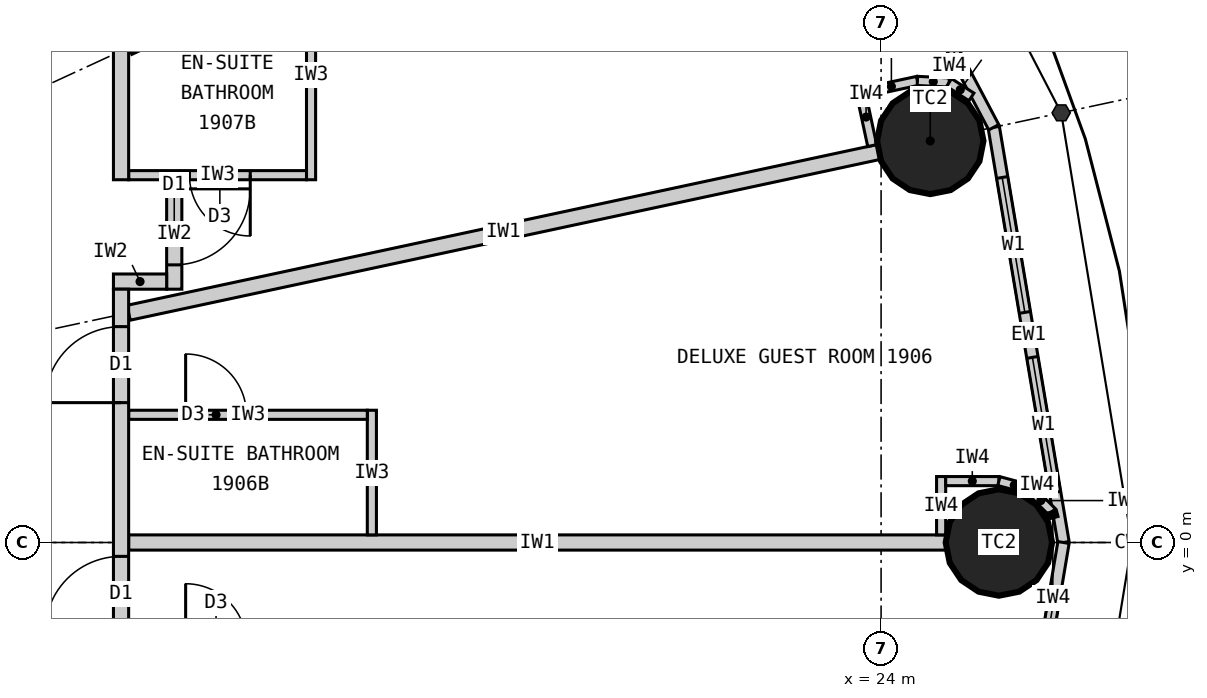
"""IFC4 building model, lengths in metres.
Left out: names, types, materials, properties, quantities, classifications, styles, units other than length and angle.
Written with IfcOpenShell. Run it as: python <this file> out.ifc"""

import sys

from ifc_helpers import new_model, si_unit, direction, frame, frame_2d, origin, origin_2d, place, context, subcontext, project, spatial, rectangle, circle, extrude, element, fill, save


model = new_model("IFC4")
c1 = context("Model", 3, precision=1e-05, world=origin(), true_north=direction((0.0, 1.0)))
c2 = subcontext(c1, "Body", "Model", "MODEL_VIEW")
j1 = project(units=[si_unit("LENGTHUNIT", "METRE"), si_unit("PLANEANGLEUNIT", "RADIAN")], contexts=[c1])
p1 = place(None, origin())
s1 = spatial("IfcSite", under=j1, at=p1, CompositionType="ELEMENT")
p2 = place(p1, origin())
s2 = spatial("IfcBuilding", under=s1, at=p2, CompositionType="ELEMENT")
p3 = place(p2, frame((0.0, 0.0, 77.1)))
s3 = spatial("IfcBuildingStorey", under=s2, at=p3, CompositionType="ELEMENT", Elevation=77.1)
for number, where, z_axis, x_axis in (
    (1, (25.55, 0.0, 0.0), (0.0, 0.0, 1.0), (1.0, 0.0, 0.0)),
    (2, (24.647, 5.283, 0.0), (0.0, 0.0, 1.0), (1.0, 0.0, 0.0)),
):
    element("IfcColumn", number, at=place(p3, frame(where, z_axis=z_axis, x_axis=x_axis)), inside=s3, PredefinedType="COLUMN", context=c2, shape_type="SweptSolid", body=[
        extrude(circle(Radius=0.7, at=origin_2d()), origin(), (0.0, 0.0, 1.0), 3.3),
    ])
p4 = place(p3, frame((26.4, 0.0, 0.0), z_axis=(0.0, 0.0, 1.0), x_axis=(-0.165642551694, 0.986185857264, 0.0)))
e3 = element("IfcWall", 3, at=p4, inside=s3, PredefinedType="ELEMENTEDWALL", context=c2, shape_type="SweptSolid", body=[
    extrude(rectangle(XDim=5.539, YDim=0.15, at=frame_2d((2.77, 0.0))), origin(), (0.0, 0.0, 1.0), 3.12),
])
p5 = place(p4, frame((0.669, 0.0, 0.9)))
e4 = element("IfcOpeningElement", 4, at=p5, cuts=e3, PredefinedType="OPENING", context=c2, shape_type="SweptSolid", body=[
    extrude(rectangle(XDim=1.8, YDim=1.9, at=frame_2d((0.9, 0.95))), frame((0.0, 0.085, 0.0), z_axis=(0.0, -1.0, 0.0), x_axis=(1.0, 0.0, 0.0)), (0.0, 0.0, 1.0), 0.17),
])
p6 = place(p4, frame((3.07, 0.0, 0.9)))
e5 = element("IfcOpeningElement", 5, at=p6, cuts=e3, PredefinedType="OPENING", context=c2, shape_type="SweptSolid", body=[
    extrude(rectangle(XDim=1.8, YDim=1.9, at=frame_2d((0.9, 0.95))), frame((0.0, 0.085, 0.0), z_axis=(0.0, -1.0, 0.0), x_axis=(1.0, 0.0, 0.0)), (0.0, 0.0, 1.0), 0.17),
])
p7 = place(p3, frame((25.482, 5.462, 0.0), z_axis=(0.0, 0.0, 1.0), x_axis=(-0.467296867008, 0.884100468321, 0.0)))
e6 = element("IfcWall", 6, at=p7, inside=s3, PredefinedType="ELEMENTEDWALL", context=c2, shape_type="SweptSolid", body=[
    extrude(rectangle(XDim=5.734, YDim=0.15, at=frame_2d((2.867, 0.0))), origin(), (0.0, 0.0, 1.0), 3.12),
])
p8 = place(p7, frame((0.767, 0.0, 0.9)))
e7 = element("IfcOpeningElement", 7, at=p8, cuts=e6, PredefinedType="OPENING", context=c2, shape_type="SweptSolid", body=[
    extrude(rectangle(XDim=1.8, YDim=1.9, at=frame_2d((0.9, 0.95))), frame((0.0, 0.085, 0.0), z_axis=(0.0, -1.0, 0.0), x_axis=(1.0, 0.0, 0.0)), (0.0, 0.0, 1.0), 0.17),
])
p9 = place(p7, frame((3.167, 0.0, 0.9)))
e8 = element("IfcOpeningElement", 8, at=p9, cuts=e6, PredefinedType="OPENING", context=c2, shape_type="SweptSolid", body=[
    extrude(rectangle(XDim=1.8, YDim=1.9, at=frame_2d((0.9, 0.95))), frame((0.0, 0.085, 0.0), z_axis=(0.0, -1.0, 0.0), x_axis=(1.0, 0.0, 0.0)), (0.0, 0.0, 1.0), 0.17),
])
p10 = place(p3, frame((25.482, -5.462, 0.0), z_axis=(0.0, 0.0, 1.0), x_axis=(0.165642551694, 0.986185857264, 0.0)))
e9 = element("IfcWall", 9, at=p10, inside=s3, PredefinedType="ELEMENTEDWALL", context=c2, shape_type="SweptSolid", body=[
    extrude(rectangle(XDim=5.539, YDim=0.15, at=frame_2d((2.77, 0.0))), origin(), (0.0, 0.0, 1.0), 3.12),
])
p11 = place(p10, frame((0.669, 0.0, 0.9)))
e10 = element("IfcOpeningElement", 10, at=p11, cuts=e9, PredefinedType="OPENING", context=c2, shape_type="SweptSolid", body=[
    extrude(rectangle(XDim=1.8, YDim=1.9, at=frame_2d((0.9, 0.95))), frame((0.0, 0.085, 0.0), z_axis=(0.0, -1.0, 0.0), x_axis=(1.0, 0.0, 0.0)), (0.0, 0.0, 1.0), 0.17),
])
p12 = place(p10, frame((3.07, 0.0, 0.9)))
e11 = element("IfcOpeningElement", 11, at=p12, cuts=e9, PredefinedType="OPENING", context=c2, shape_type="SweptSolid", body=[
    extrude(rectangle(XDim=1.8, YDim=1.9, at=frame_2d((0.9, 0.95))), frame((0.0, 0.085, 0.0), z_axis=(0.0, -1.0, 0.0), x_axis=(1.0, 0.0, 0.0)), (0.0, 0.0, 1.0), 0.17),
])
p13 = place(p3, frame((14.1, 0.0, 0.0), z_axis=(0.0, 0.0, 1.0), x_axis=(1.0, 0.0, 0.0)))
e12 = element("IfcWall", 12, at=p13, inside=s3, PredefinedType="PARTITIONING", context=c2, shape_type="SweptSolid", body=[
    extrude(rectangle(XDim=10.75, YDim=0.2, at=frame_2d((5.375, 0.0))), origin(), (0.0, 0.0, 1.0), 2.27),
])
p14 = place(p3, frame((14.1, 3.022, 0.0), z_axis=(0.0, 0.0, 1.0), x_axis=(0.977790014929, 0.209586943072, 0.0)))
e13 = element("IfcWall", 13, at=p14, inside=s3, PredefinedType="PARTITIONING", context=c2, shape_type="SweptSolid", body=[
    extrude(rectangle(XDim=10.087, YDim=0.2, at=frame_2d((5.043, 0.0))), origin(), (0.0, 0.0, 1.0), 2.32),
])
p15 = place(p3, frame((14.1, 6.512, 0.0), z_axis=(0.0, 0.0, 1.0), x_axis=(0.907832871056, 0.419332181247, 0.0)))
e14 = element("IfcWall", 14, at=p15, inside=s3, PredefinedType="PARTITIONING", context=c2, shape_type="SweptSolid", body=[
    extrude(rectangle(XDim=8.023, YDim=0.2, at=frame_2d((4.011, 0.0))), origin(), (0.0, 0.0, 1.0), 2.32),
])
p16 = place(p3, frame((17.3, 0.1, 0.0), z_axis=(0.0, 0.0, 1.0), x_axis=(0.0, 1.0, 0.0)))
e15 = element("IfcWall", 15, at=p16, inside=s3, PredefinedType="PARTITIONING", context=c2, shape_type="SweptSolid", body=[
    extrude(rectangle(XDim=1.64, YDim=0.12, at=frame_2d((0.82, 0.0))), origin(), (0.0, 0.0, 1.0), 3.12),
])
p17 = place(p3, frame((14.1, 1.68, 0.0), z_axis=(0.0, 0.0, 1.0), x_axis=(1.0, 0.0, 0.0)))
e16 = element("IfcWall", 16, at=p17, inside=s3, PredefinedType="PARTITIONING", context=c2, shape_type="SweptSolid", body=[
    extrude(rectangle(XDim=3.14, YDim=0.12, at=frame_2d((1.57, 0.0))), origin(), (0.0, 0.0, 1.0), 3.12),
])
p18 = place(p17, frame((0.75, 0.0, 0.0)))
e17 = element("IfcOpeningElement", 17, at=p18, cuts=e16, PredefinedType="OPENING", context=c2, shape_type="SweptSolid", body=[
    extrude(rectangle(XDim=0.8, YDim=2.1, at=frame_2d((0.4, 1.05))), frame((0.0, 0.07, 0.0), z_axis=(0.0, -1.0, 0.0), x_axis=(1.0, 0.0, 0.0)), (0.0, 0.0, 1.0), 0.14),
])
p19 = place(p3, frame((16.5, 7.521, 0.0), z_axis=(0.0, 0.0, 1.0), x_axis=(0.0, -1.0, 0.0)))
e18 = element("IfcWall", 18, at=p19, inside=s3, PredefinedType="PARTITIONING", context=c2, shape_type="SweptSolid", body=[
    extrude(rectangle(XDim=2.749, YDim=0.12, at=frame_2d((1.374, 0.0))), origin(), (0.0, 0.0, 1.0), 3.12),
])
p20 = place(p3, frame((14.1, 4.833, 0.0), z_axis=(0.0, 0.0, 1.0), x_axis=(1.0, 0.0, 0.0)))
e19 = element("IfcWall", 19, at=p20, inside=s3, PredefinedType="PARTITIONING", context=c2, shape_type="SweptSolid", body=[
    extrude(rectangle(XDim=2.34, YDim=0.12, at=frame_2d((1.17, 0.0))), origin(), (0.0, 0.0, 1.0), 3.12),
])
p21 = place(p20, frame((0.8, 0.0, 0.0)))
e20 = element("IfcOpeningElement", 20, at=p21, cuts=e19, PredefinedType="OPENING", context=c2, shape_type="SweptSolid", body=[
    extrude(rectangle(XDim=0.8, YDim=2.1, at=frame_2d((0.4, 1.05))), frame((0.0, 0.07, 0.0), z_axis=(0.0, -1.0, 0.0), x_axis=(1.0, 0.0, 0.0)), (0.0, 0.0, 1.0), 0.14),
])
p22 = place(p3, frame((14.7, 3.333, 0.0), z_axis=(0.0, 0.0, 1.0), x_axis=(0.0, 1.0, 0.0)))
e21 = element("IfcWall", 21, at=p22, inside=s3, PredefinedType="PARTITIONING", context=c2, shape_type="SweptSolid", body=[
    extrude(rectangle(XDim=1.44, YDim=0.2, at=frame_2d((0.72, 0.0))), origin(), (0.0, 0.0, 1.0), 3.12),
])
p23 = place(p22, frame((0.32, 0.0, 0.0)))
e22 = element("IfcOpeningElement", 22, at=p23, cuts=e21, PredefinedType="OPENING", context=c2, shape_type="SweptSolid", body=[
    extrude(rectangle(XDim=1.0, YDim=2.2, at=frame_2d((0.5, 1.1))), frame((0.0, 0.11, 0.0), z_axis=(0.0, -1.0, 0.0), x_axis=(1.0, 0.0, 0.0)), (0.0, 0.0, 1.0), 0.22),
])
p24 = place(p3, frame((13.9, 3.433, 0.0), z_axis=(0.0, 0.0, 1.0), x_axis=(1.0, 0.0, 0.0)))
e23 = element("IfcWall", 23, at=p24, inside=s3, PredefinedType="PARTITIONING", context=c2, shape_type="SweptSolid", body=[
    extrude(rectangle(XDim=0.7, YDim=0.2, at=frame_2d((0.35, 0.0))), origin(), (0.0, 0.0, 1.0), 2.32),
])
p25 = place(p3, frame((14.0, -9.9, 0.0), z_axis=(0.0, 0.0, 1.0), x_axis=(0.0, 1.0, 0.0)))
e24 = element("IfcWall", 24, at=p25, inside=s3, PredefinedType="PARTITIONING", context=c2, shape_type="SweptSolid", body=[
    extrude(rectangle(XDim=13.232, YDim=0.2, at=frame_2d((6.616, 0.0))), origin(), (0.0, 0.0, 1.0), 3.12),
])
p26 = place(p25, frame((4.948, 0.0, 0.0)))
e25 = element("IfcOpeningElement", 25, at=p26, cuts=e24, PredefinedType="OPENING", context=c2, shape_type="SweptSolid", body=[
    extrude(rectangle(XDim=1.0, YDim=2.2, at=frame_2d((0.5, 1.1))), frame((0.0, 0.11, 0.0), z_axis=(0.0, -1.0, 0.0), x_axis=(1.0, 0.0, 0.0)), (0.0, 0.0, 1.0), 0.22),
])
p27 = place(p25, frame((8.718, 0.0, 0.0)))
e26 = element("IfcOpeningElement", 26, at=p27, cuts=e24, PredefinedType="OPENING", context=c2, shape_type="SweptSolid", body=[
    extrude(rectangle(XDim=1.0, YDim=2.2, at=frame_2d((0.5, 1.1))), frame((0.0, 0.11, 0.0), z_axis=(0.0, -1.0, 0.0), x_axis=(1.0, 0.0, 0.0)), (0.0, 0.0, 1.0), 0.22),
])
p28 = place(p25, frame((11.74, 0.0, 0.0)))
e27 = element("IfcOpeningElement", 27, at=p28, cuts=e24, PredefinedType="OPENING", context=c2, shape_type="SweptSolid", body=[
    extrude(rectangle(XDim=1.0, YDim=2.2, at=frame_2d((0.5, 1.1))), frame((0.0, 0.11, 0.0), z_axis=(0.0, -1.0, 0.0), x_axis=(1.0, 0.0, 0.0)), (0.0, 0.0, 1.0), 0.22),
])
p29 = place(p3, frame((14.0, 4.772, 0.0), z_axis=(0.0, 0.0, 1.0), x_axis=(0.0, 1.0, 0.0)))
e28 = element("IfcWall", 28, at=p29, inside=s3, PredefinedType="PARTITIONING", context=c2, shape_type="SweptSolid", body=[
    extrude(rectangle(XDim=5.127, YDim=0.2, at=frame_2d((2.564, 0.0))), origin(), (0.0, 0.0, 1.0), 3.12),
])
p30 = place(p29, frame((4.025, 0.0, 0.0)))
e29 = element("IfcOpeningElement", 29, at=p30, cuts=e28, PredefinedType="OPENING", context=c2, shape_type="SweptSolid", body=[
    extrude(rectangle(XDim=1.0, YDim=2.2, at=frame_2d((0.5, 1.1))), frame((0.0, 0.11, 0.0), z_axis=(0.0, -1.0, 0.0), x_axis=(1.0, 0.0, 0.0)), (0.0, 0.0, 1.0), 0.22),
])
p31 = place(p3, frame((24.79, 0.1, 0.0), z_axis=(0.0, 0.0, 1.0), x_axis=(0.0, 1.0, 0.0)))
e30 = element("IfcWall", 30, at=p31, inside=s3, PredefinedType="PARTITIONING", context=c2, shape_type="SweptSolid", body=[
    extrude(rectangle(XDim=0.767, YDim=0.12, at=frame_2d((0.384, 0.0))), origin(), (0.0, 0.0, 1.0), 3.12),
])
p32 = place(p3, frame((24.85, 0.808, 0.0), z_axis=(0.0, 0.0, 1.0), x_axis=(1.0, 0.0, 0.0)))
e31 = element("IfcWall", 31, at=p32, inside=s3, PredefinedType="PARTITIONING", context=c2, shape_type="SweptSolid", body=[
    extrude(rectangle(XDim=0.7, YDim=0.12, at=frame_2d((0.35, 0.0))), origin(), (0.0, 0.0, 1.0), 3.12),
])
p33 = place(p3, frame((25.55, 0.808, 0.0), z_axis=(0.0, 0.0, 1.0), x_axis=(0.965807183573, -0.2592614205, 0.0)))
e32 = element("IfcWall", 32, at=p33, inside=s3, PredefinedType="PARTITIONING", context=c2, shape_type="SweptSolid", body=[
    extrude(rectangle(XDim=0.418, YDim=0.12, at=frame_2d((0.209, 0.0))), origin(), (0.0, 0.0, 1.0), 3.12),
])
p34 = place(p3, frame((25.954, 0.699, 0.0), z_axis=(0.0, 0.0, 1.0), x_axis=(0.707106781187, -0.707106781187, 0.0)))
e33 = element("IfcWall", 33, at=p34, inside=s3, PredefinedType="PARTITIONING", context=c2, shape_type="SweptSolid", body=[
    extrude(rectangle(XDim=0.418, YDim=0.12, at=frame_2d((0.209, 0.0))), origin(), (0.0, 0.0, 1.0), 3.12),
])
p35 = place(p3, frame((26.249, 0.404, 0.0), z_axis=(0.0, 0.0, 1.0), x_axis=(0.259754282609, -0.965674744759, 0.0)))
e34 = element("IfcWall", 34, at=p35, inside=s3, PredefinedType="PARTITIONING", context=c2, shape_type="SweptSolid", body=[
    extrude(rectangle(XDim=0.08, YDim=0.12, at=frame_2d((0.04, 0.0))), origin(), (0.0, 0.0, 1.0), 3.12),
])
p36 = place(p3, frame((23.883, 5.222, 0.0), z_axis=(0.0, 0.0, 1.0), x_axis=(-0.209311842415, 0.977848941619, 0.0)))
e35 = element("IfcWall", 35, at=p36, inside=s3, PredefinedType="PARTITIONING", context=c2, shape_type="SweptSolid", body=[
    extrude(rectangle(XDim=0.768, YDim=0.12, at=frame_2d((0.384, 0.0))), origin(), (0.0, 0.0, 1.0), 3.12),
])
p37 = place(p3, frame((23.793, 5.926, 0.0), z_axis=(0.0, 0.0, 1.0), x_axis=(0.977792206673, 0.209576717621, 0.0)))
e36 = element("IfcWall", 36, at=p37, inside=s3, PredefinedType="PARTITIONING", context=c2, shape_type="SweptSolid", body=[
    extrude(rectangle(XDim=0.7, YDim=0.12, at=frame_2d((0.35, 0.0))), origin(), (0.0, 0.0, 1.0), 3.12),
])
p38 = place(p3, frame((24.478, 6.073, 0.0), z_axis=(0.0, 0.0, 1.0), x_axis=(0.998708262812, -0.05081147302, 0.0)))
e37 = element("IfcWall", 37, at=p38, inside=s3, PredefinedType="PARTITIONING", context=c2, shape_type="SweptSolid", body=[
    extrude(rectangle(XDim=0.418, YDim=0.12, at=frame_2d((0.209, 0.0))), origin(), (0.0, 0.0, 1.0), 3.12),
])
p39 = place(p3, frame((24.895, 6.052, 0.0), z_axis=(0.0, 0.0, 1.0), x_axis=(0.839495197275, -0.54336710772, 0.0)))
e38 = element("IfcWall", 38, at=p39, inside=s3, PredefinedType="PARTITIONING", context=c2, shape_type="SweptSolid", body=[
    extrude(rectangle(XDim=0.35, YDim=0.12, at=frame_2d((0.175, 0.0))), origin(), (0.0, 0.0, 1.0), 3.12),
])
p40 = place(p5, origin())
e39 = element("IfcWindow", 39, at=p40, inside=s3, PartitioningType="SINGLE_PANEL", PredefinedType="WINDOW", context=c2, shape_type="SweptSolid", body=[
    extrude(rectangle(XDim=1.8, YDim=1.9, at=frame_2d((0.9, 0.95))), frame((0.0, 0.03, 0.0), z_axis=(0.0, -1.0, 0.0), x_axis=(1.0, 0.0, 0.0)), (0.0, 0.0, 1.0), 0.06),
])
fill(e4, e39)
p41 = place(p6, origin())
e40 = element("IfcWindow", 40, at=p41, inside=s3, PartitioningType="SINGLE_PANEL", PredefinedType="WINDOW", context=c2, shape_type="SweptSolid", body=[
    extrude(rectangle(XDim=1.8, YDim=1.9, at=frame_2d((0.9, 0.95))), frame((0.0, 0.03, 0.0), z_axis=(0.0, -1.0, 0.0), x_axis=(1.0, 0.0, 0.0)), (0.0, 0.0, 1.0), 0.06),
])
fill(e5, e40)
p42 = place(p8, origin())
e41 = element("IfcWindow", 41, at=p42, inside=s3, PartitioningType="SINGLE_PANEL", PredefinedType="WINDOW", context=c2, shape_type="SweptSolid", body=[
    extrude(rectangle(XDim=1.8, YDim=1.9, at=frame_2d((0.9, 0.95))), frame((0.0, 0.03, 0.0), z_axis=(0.0, -1.0, 0.0), x_axis=(1.0, 0.0, 0.0)), (0.0, 0.0, 1.0), 0.06),
])
fill(e7, e41)
p43 = place(p12, origin())
e42 = element("IfcWindow", 42, at=p43, inside=s3, PartitioningType="SINGLE_PANEL", PredefinedType="WINDOW", context=c2, shape_type="SweptSolid", body=[
    extrude(rectangle(XDim=1.8, YDim=1.9, at=frame_2d((0.9, 0.95))), frame((0.0, 0.03, 0.0), z_axis=(0.0, -1.0, 0.0), x_axis=(1.0, 0.0, 0.0)), (0.0, 0.0, 1.0), 0.06),
])
fill(e11, e42)
p44 = place(p27, origin())
e43 = element("IfcDoor", 43, at=p44, inside=s3, OperationType="SINGLE_SWING_LEFT", PredefinedType="DOOR", context=c2, shape_type="SweptSolid", body=[
    extrude(rectangle(XDim=1.0, YDim=2.2, at=frame_2d((0.5, 1.1))), frame((0.0, 0.025, 0.0), z_axis=(0.0, -1.0, 0.0), x_axis=(1.0, 0.0, 0.0)), (0.0, 0.0, 1.0), 0.05),
])
fill(e26, e43)
p45 = place(p18, origin())
e44 = element("IfcDoor", 44, at=p45, inside=s3, OperationType="SINGLE_SWING_LEFT", PredefinedType="DOOR", context=c2, shape_type="SweptSolid", body=[
    extrude(rectangle(XDim=0.8, YDim=2.1, at=frame_2d((0.4, 1.05))), frame((0.0, 0.025, 0.0), z_axis=(0.0, -1.0, 0.0), x_axis=(1.0, 0.0, 0.0)), (0.0, 0.0, 1.0), 0.05),
])
fill(e17, e44)
p46 = place(p28, origin())
e45 = element("IfcDoor", 45, at=p46, inside=s3, OperationType="SINGLE_SWING_LEFT", PredefinedType="DOOR", context=c2, shape_type="SweptSolid", body=[
    extrude(rectangle(XDim=1.0, YDim=2.2, at=frame_2d((0.5, 1.1))), frame((0.0, 0.025, 0.0), z_axis=(0.0, -1.0, 0.0), x_axis=(1.0, 0.0, 0.0)), (0.0, 0.0, 1.0), 0.05),
])
fill(e27, e45)
p47 = place(p21, origin())
e46 = element("IfcDoor", 46, at=p47, inside=s3, OperationType="SINGLE_SWING_RIGHT", PredefinedType="DOOR", context=c2, shape_type="SweptSolid", body=[
    extrude(rectangle(XDim=0.8, YDim=2.1, at=frame_2d((0.4, 1.05))), frame((0.0, 0.025, 0.0), z_axis=(0.0, -1.0, 0.0), x_axis=(1.0, 0.0, 0.0)), (0.0, 0.0, 1.0), 0.05),
])
fill(e20, e46)
p48 = place(p23, origin())
e47 = element("IfcDoor", 47, at=p48, inside=s3, OperationType="SINGLE_SWING_RIGHT", PredefinedType="DOOR", context=c2, shape_type="SweptSolid", body=[
    extrude(rectangle(XDim=1.0, YDim=2.2, at=frame_2d((0.5, 1.1))), frame((0.0, 0.025, 0.0), z_axis=(0.0, -1.0, 0.0), x_axis=(1.0, 0.0, 0.0)), (0.0, 0.0, 1.0), 0.05),
])
fill(e22, e47)
save(model, sys.argv[1])
